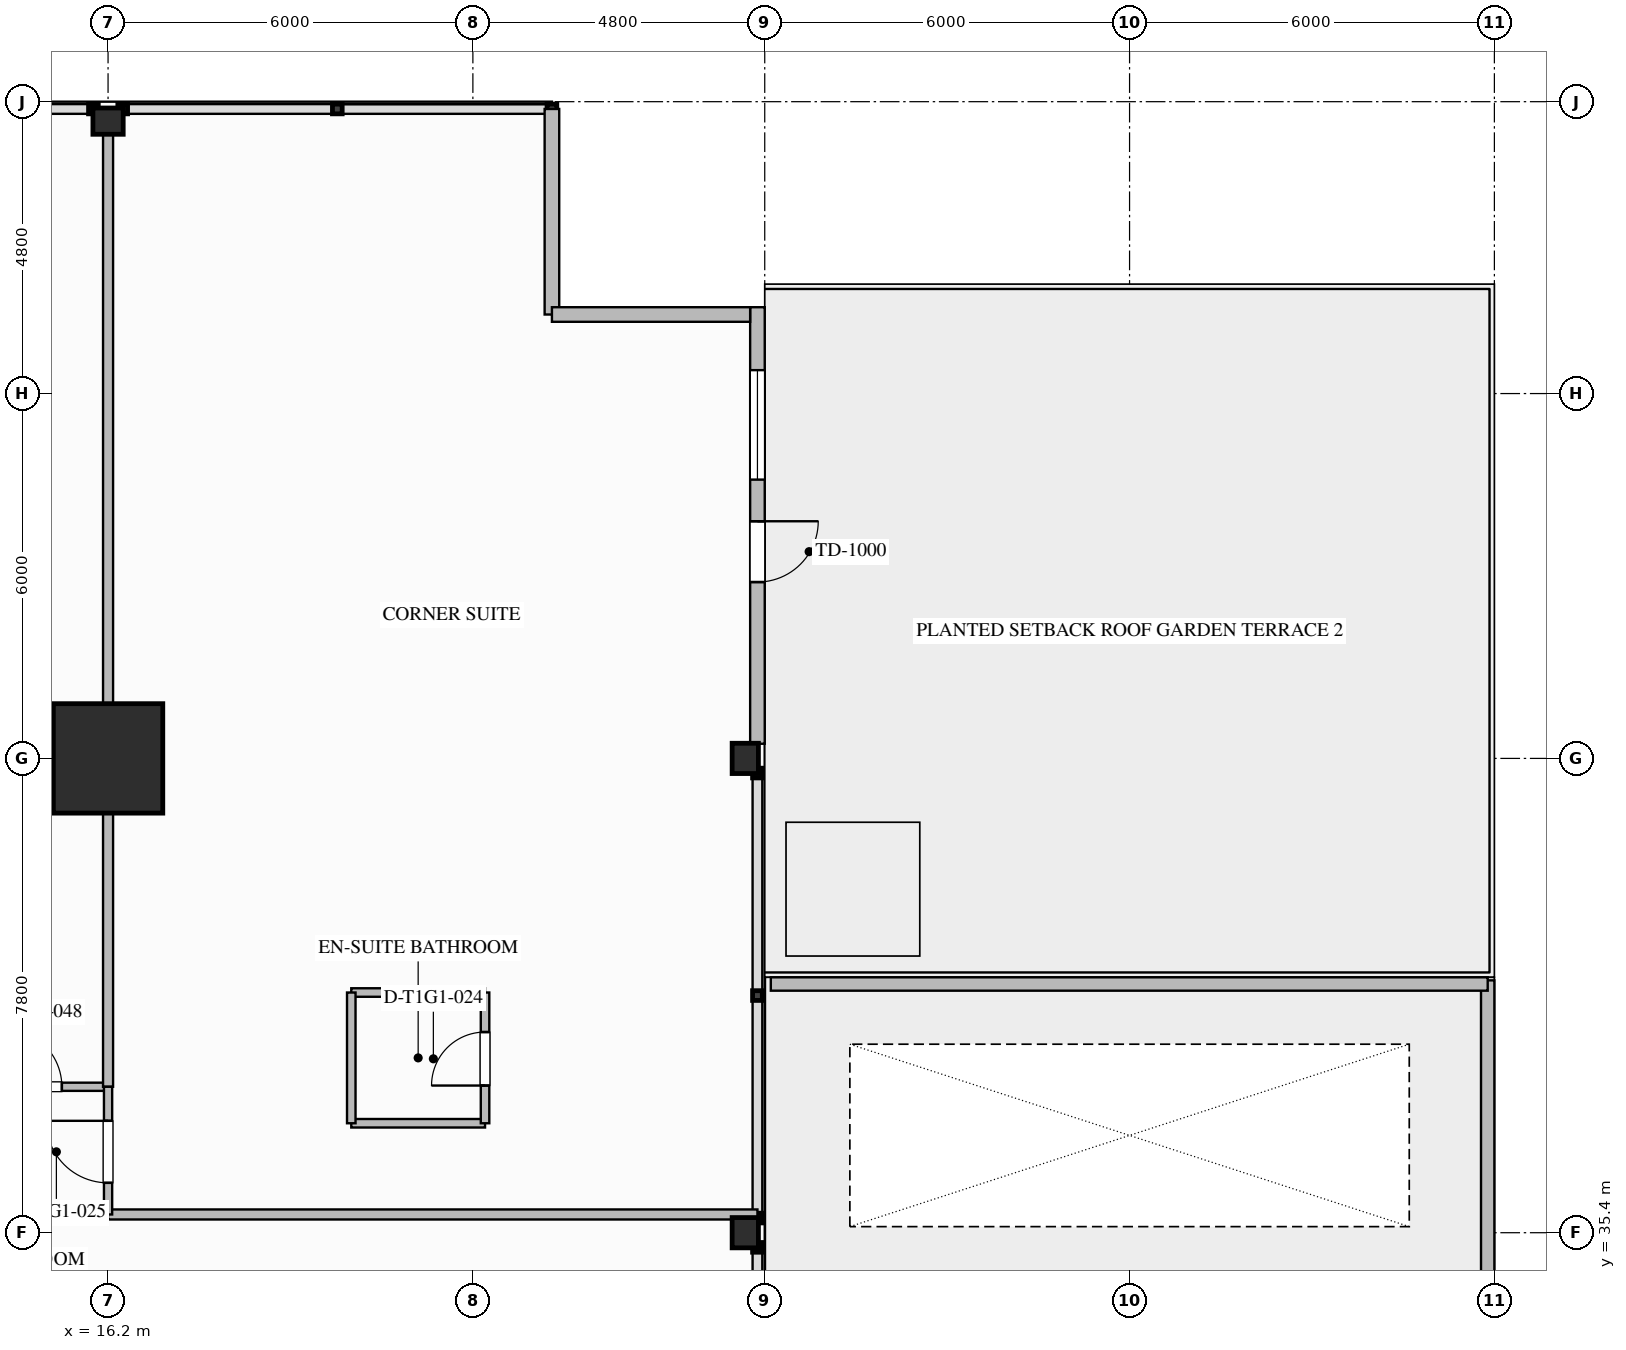
"""IFC4 building model, lengths in metres.
Left out: names, types, materials, properties, quantities, classifications, styles, units other than length and angle.
Written with IfcOpenShell. Run it as: python <this file> out.ifc"""

import sys

from ifc_helpers import new_model, si_unit, direction, frame, frame_2d, origin, origin_2d, place, context, subcontext, project, spatial, rectangle, i_section, extrude, element, fill, save


model = new_model("IFC4")
c1 = context("Model", 3, precision=1e-05, world=origin(), true_north=direction((0.0, 1.0)))
c2 = subcontext(c1, "Body", "Model", "MODEL_VIEW")
j1 = project(units=[si_unit("LENGTHUNIT", "METRE"), si_unit("PLANEANGLEUNIT", "RADIAN")], contexts=[c1])
p1 = place(None, origin())
s1 = spatial("IfcSite", under=j1, at=p1, CompositionType="ELEMENT")
p2 = place(p1, origin())
s2 = spatial("IfcBuilding", under=s1, at=p2, CompositionType="ELEMENT")
p3 = place(p2, frame((0.0, 0.0, 33.2)))
s3 = spatial("IfcBuildingStorey", under=s2, at=p3, CompositionType="ELEMENT", Elevation=33.2)
p4 = place(p3, frame((16.2, 43.2, 0.0), z_axis=(0.0, 0.0, 1.0), x_axis=(1.0, 0.0, 0.0)))
e1 = element("IfcColumn", 1, at=p4, inside=s3, PredefinedType="COLUMN", context=c2, shape_type="SweptSolid", body=[
    extrude(rectangle(XDim=1.8, YDim=1.8, at=origin_2d()), origin(), (0.0, 0.0, 1.0), 3.5),
])
for number, where, z_axis, x_axis in (
    (2, (26.68, 35.4, -0.26), (0.0, 0.0, 1.0), (1.0, 0.0, 0.0)),
    (3, (26.68, 43.2, -0.26), (0.0, 0.0, 1.0), (1.0, 0.0, 0.0)),
    (4, (16.2, 53.68, -0.26), (0.0, 0.0, 1.0), (0.0, 1.0, 0.0)),
):
    element("IfcColumn", number, at=place(p3, frame(where, z_axis=z_axis, x_axis=x_axis)), inside=s3, PredefinedType="COLUMN", context=c2, shape_type="SweptSolid", body=[
        extrude(i_section(OverallWidth=0.432, OverallDepth=0.498, WebThickness=0.056, FlangeThickness=0.089, FilletRadius=0.03, at=origin_2d()), origin(), (0.0, 0.0, 1.0), 3.757),
    ])
p5 = place(p3, frame((38.89, 39.55, 0.0), z_axis=(0.0, 0.0, 1.0), x_axis=(0.0, -1.0, 0.0)))
e5 = element("IfcWall", 5, at=p5, inside=s3, PredefinedType="PARAPET", context=c2, shape_type="SweptSolid", body=[
    extrude(rectangle(XDim=25.1, YDim=0.22, at=frame_2d((12.55, 0.0))), origin(), (0.0, 0.0, 1.0), 1.2),
])
p6 = place(p3, frame((27.1, 39.49, 0.0), z_axis=(0.0, 0.0, 1.0), x_axis=(1.0, 0.0, 0.0)))
e6 = element("IfcWall", 6, at=p6, inside=s3, PredefinedType="PARAPET", context=c2, shape_type="SweptSolid", body=[
    extrude(rectangle(XDim=11.79, YDim=0.22, at=frame_2d((5.895, 0.0))), origin(), (0.0, 0.0, 1.0), 1.2),
])
p7 = place(p3, frame((26.88, 50.62, 0.0), z_axis=(0.0, 0.0, 1.0), x_axis=(0.0, -1.0, 0.0)))
e7 = element("IfcWall", 7, at=p7, inside=s3, PredefinedType="STANDARD", context=c2, shape_type="SweptSolid", body=[
    extrude(rectangle(XDim=7.179, YDim=0.24, at=frame_2d((3.59, 0.0))), origin(), (0.0, 0.0, 1.0), 3.24),
])
p8 = place(p7, frame((3.52, 0.0, 0.0)))
e8 = element("IfcOpeningElement", 8, at=p8, cuts=e7, PredefinedType="OPENING", context=c2, shape_type="SweptSolid", body=[
    extrude(rectangle(XDim=1.0, YDim=2.2, at=frame_2d((0.5, 1.1))), frame((0.0, 0.13, 0.0), z_axis=(0.0, -1.0, 0.0), x_axis=(1.0, 0.0, 0.0)), (0.0, 0.0, 1.0), 0.26),
])
p9 = place(p7, frame((1.035, 0.0, 0.75)))
e9 = element("IfcOpeningElement", 9, at=p9, cuts=e7, PredefinedType="OPENING", context=c2, shape_type="SweptSolid", body=[
    extrude(rectangle(XDim=1.8, YDim=2.05, at=frame_2d((0.9, 1.025))), frame((0.0, 0.13, 0.0), z_axis=(0.0, -1.0, 0.0), x_axis=(1.0, 0.0, 0.0)), (0.0, 0.0, 1.0), 0.26),
])
p10 = place(p3, frame((23.5, 53.88, 0.0), z_axis=(0.0, 0.0, 1.0), x_axis=(0.0, -1.0, 0.0)))
e10 = element("IfcWall", 10, at=p10, inside=s3, PredefinedType="STANDARD", context=c2, shape_type="SweptSolid", body=[
    extrude(rectangle(XDim=3.38, YDim=0.24, at=frame_2d((1.69, 0.0))), origin(), (0.0, 0.0, 1.0), 3.24),
])
p11 = place(p3, frame((23.5, 50.5, 0.0), z_axis=(0.0, 0.0, 1.0), x_axis=(1.0, 0.0, 0.0)))
e11 = element("IfcWall", 11, at=p11, inside=s3, PredefinedType="STANDARD", context=c2, shape_type="SweptSolid", body=[
    extrude(rectangle(XDim=3.26, YDim=0.24, at=frame_2d((1.63, 0.0))), origin(), (0.0, 0.0, 1.0), 3.24),
])
p12 = place(p3, frame((-16.2, 37.8, 0.0), z_axis=(0.0, 0.0, 1.0), x_axis=(1.0, 0.0, 0.0)))
e12 = element("IfcWall", 12, at=p12, inside=s3, PredefinedType="PARTITIONING", context=c2, shape_type="SweptSolid", body=[
    extrude(rectangle(XDim=32.4, YDim=0.135, at=frame_2d((16.2, 0.0))), origin(), (0.0, 0.0, 1.0), 3.24),
])
p13 = place(p12, frame((3.189, 0.0, 0.0)))
e13 = element("IfcOpeningElement", 13, at=p13, cuts=e12, PredefinedType="OPENING", context=c2, shape_type="SweptSolid", body=[
    extrude(rectangle(XDim=0.96, YDim=2.15, at=frame_2d((0.48, 1.075))), frame((0.0, 0.077, 0.0), z_axis=(0.0, -1.0, 0.0), x_axis=(1.0, 0.0, 0.0)), (0.0, 0.0, 1.0), 0.155),
])
p14 = place(p12, frame((8.229, 0.0, 0.0)))
e14 = element("IfcOpeningElement", 14, at=p14, cuts=e12, PredefinedType="OPENING", context=c2, shape_type="SweptSolid", body=[
    extrude(rectangle(XDim=1.26, YDim=2.2, at=frame_2d((0.63, 1.1))), frame((0.0, 0.077, 0.0), z_axis=(0.0, -1.0, 0.0), x_axis=(1.0, 0.0, 0.0)), (0.0, 0.0, 1.0), 0.155),
])
p15 = place(p12, frame((12.78, 0.0, 0.0)))
e15 = element("IfcOpeningElement", 15, at=p15, cuts=e12, PredefinedType="OPENING", context=c2, shape_type="SweptSolid", body=[
    extrude(rectangle(XDim=1.02, YDim=2.15, at=frame_2d((0.51, 1.075))), frame((0.0, 0.077, 0.0), z_axis=(0.0, -1.0, 0.0), x_axis=(1.0, 0.0, 0.0)), (0.0, 0.0, 1.0), 0.155),
])
p16 = place(p12, frame((19.425, 0.0, 0.0)))
e16 = element("IfcOpeningElement", 16, at=p16, cuts=e12, PredefinedType="OPENING", context=c2, shape_type="SweptSolid", body=[
    extrude(rectangle(XDim=0.96, YDim=2.15, at=frame_2d((0.48, 1.075))), frame((0.0, 0.077, 0.0), z_axis=(0.0, -1.0, 0.0), x_axis=(1.0, 0.0, 0.0)), (0.0, 0.0, 1.0), 0.155),
])
p17 = place(p12, frame((24.92, 0.0, 0.0)))
e17 = element("IfcOpeningElement", 17, at=p17, cuts=e12, PredefinedType="OPENING", context=c2, shape_type="SweptSolid", body=[
    extrude(rectangle(XDim=1.26, YDim=2.2, at=frame_2d((0.63, 1.1))), frame((0.0, 0.077, 0.0), z_axis=(0.0, -1.0, 0.0), x_axis=(1.0, 0.0, 0.0)), (0.0, 0.0, 1.0), 0.155),
])
p18 = place(p12, frame((30.68, 0.0, 0.0)))
e18 = element("IfcOpeningElement", 18, at=p18, cuts=e12, PredefinedType="OPENING", context=c2, shape_type="SweptSolid", body=[
    extrude(rectangle(XDim=0.96, YDim=2.15, at=frame_2d((0.48, 1.075))), frame((0.0, 0.077, 0.0), z_axis=(0.0, -1.0, 0.0), x_axis=(1.0, 0.0, 0.0)), (0.0, 0.0, 1.0), 0.155),
])
p19 = place(p3, frame((10.8, 35.7, 0.0), z_axis=(0.0, 0.0, 1.0), x_axis=(1.0, 0.0, 0.0)))
e19 = element("IfcWall", 19, at=p19, inside=s3, PredefinedType="PARTITIONING", context=c2, shape_type="SweptSolid", body=[
    extrude(rectangle(XDim=5.4, YDim=0.135, at=frame_2d((2.7, 0.0))), origin(), (0.0, 0.0, 1.0), 3.24),
])
p20 = place(p3, frame((16.2, 37.8, 0.0), z_axis=(0.0, 0.0, 1.0), x_axis=(0.0, 1.0, 0.0)))
e20 = element("IfcWall", 20, at=p20, inside=s3, PredefinedType="PARTITIONING", context=c2, shape_type="SweptSolid", body=[
    extrude(rectangle(XDim=16.08, YDim=0.165, at=frame_2d((8.04, 0.0))), origin(), (0.0, 0.0, 1.0), 2.298),
])
p21 = place(p3, frame((16.2, 35.7, 0.0), z_axis=(0.0, 0.0, 1.0), x_axis=(1.0, 0.0, 0.0)))
e21 = element("IfcWall", 21, at=p21, inside=s3, PredefinedType="PARTITIONING", context=c2, shape_type="SweptSolid", body=[
    extrude(rectangle(XDim=10.68, YDim=0.165, at=frame_2d((5.34, 0.0))), origin(), (0.0, 0.0, 1.0), 2.298),
])
p22 = place(p3, frame((16.2, 35.7, 0.0), z_axis=(0.0, 0.0, 1.0), x_axis=(0.0, 1.0, 0.0)))
e22 = element("IfcWall", 22, at=p22, inside=s3, PredefinedType="PARTITIONING", context=c2, shape_type="SweptSolid", body=[
    extrude(rectangle(XDim=2.1, YDim=0.135, at=frame_2d((1.05, 0.0))), origin(), (0.0, 0.0, 1.0), 2.298),
])
p23 = place(p22, frame((0.52, 0.0, 0.0)))
e23 = element("IfcOpeningElement", 23, at=p23, cuts=e22, PredefinedType="OPENING", context=c2, shape_type="SweptSolid", body=[
    extrude(rectangle(XDim=1.02, YDim=2.15, at=frame_2d((0.51, 1.075))), frame((0.0, 0.077, 0.0), z_axis=(0.0, -1.0, 0.0), x_axis=(1.0, 0.0, 0.0)), (0.0, 0.0, 1.0), 0.155),
])
for number, where, z_axis, x_axis in (
    (24, (20.2, 37.2, 0.0), (0.0, 0.0, 1.0), (1.0, 0.0, 0.0)),
    (25, (20.2, 39.35, 0.0), (0.0, 0.0, 1.0), (1.0, 0.0, 0.0)),
):
    element("IfcWall", number, at=place(p3, frame(where, z_axis=z_axis, x_axis=x_axis)), inside=s3, PredefinedType="PLUMBINGWALL", context=c2, shape_type="SweptSolid", body=[
        extrude(rectangle(XDim=2.2, YDim=0.14, at=frame_2d((1.1, 0.0))), origin(), (0.0, 0.0, 1.0), 3.24),
    ])
p24 = place(p3, frame((20.2, 37.2, 0.0), z_axis=(0.0, 0.0, 1.0), x_axis=(0.0, 1.0, 0.0)))
e26 = element("IfcWall", 26, at=p24, inside=s3, PredefinedType="PLUMBINGWALL", context=c2, shape_type="SweptSolid", body=[
    extrude(rectangle(XDim=2.15, YDim=0.14, at=frame_2d((1.075, 0.0))), origin(), (0.0, 0.0, 1.0), 3.24),
])
p25 = place(p3, frame((22.4, 37.2, 0.0), z_axis=(0.0, 0.0, 1.0), x_axis=(0.0, 1.0, 0.0)))
e27 = element("IfcWall", 27, at=p25, inside=s3, PredefinedType="PLUMBINGWALL", context=c2, shape_type="SweptSolid", body=[
    extrude(rectangle(XDim=2.15, YDim=0.14, at=frame_2d((1.075, 0.0))), origin(), (0.0, 0.0, 1.0), 3.24),
])
p26 = place(p25, frame((0.62, 0.0, 0.0)))
e28 = element("IfcOpeningElement", 28, at=p26, cuts=e27, PredefinedType="OPENING", context=c2, shape_type="SweptSolid", body=[
    extrude(rectangle(XDim=0.88, YDim=2.1, at=frame_2d((0.44, 1.05))), frame((0.0, 0.08, 0.0), z_axis=(0.0, -1.0, 0.0), x_axis=(1.0, 0.0, 0.0)), (0.0, 0.0, 1.0), 0.16),
])
p27 = place(p3, frame((0.0, 0.0, -0.28)))
p28 = place(p27, frame((33.0, 37.0, 0.0)))
p29 = place(p28, frame((0.0, 0.0, 0.23)))
e29 = element("IfcWindow", 29, at=p29, inside=s3, PartitioningType="SINGLE_PANEL", PredefinedType="SKYLIGHT", context=c2, shape_type="SweptSolid", body=[
    extrude(rectangle(XDim=9.24, YDim=3.04, at=origin_2d()), origin(), (0.0, 0.0, 1.0), 0.05),
])
p30 = place(p8, origin())
e30 = element("IfcDoor", 30, at=p30, inside=s3, OperationType="SINGLE_SWING_LEFT", PredefinedType="DOOR", context=c2, shape_type="SweptSolid", body=[
    extrude(rectangle(XDim=1.0, YDim=2.2, at=frame_2d((0.5, 1.1))), frame((0.0, 0.025, 0.0), z_axis=(0.0, -1.0, 0.0), x_axis=(1.0, 0.0, 0.0)), (0.0, 0.0, 1.0), 0.05),
])
fill(e8, e30)
p31 = place(p9, origin())
e31 = element("IfcWindow", 31, at=p31, inside=s3, PartitioningType="SINGLE_PANEL", PredefinedType="WINDOW", context=c2, shape_type="SweptSolid", body=[
    extrude(rectangle(XDim=1.8, YDim=2.05, at=frame_2d((0.9, 1.025))), frame((0.0, 0.03, 0.0), z_axis=(0.0, -1.0, 0.0), x_axis=(1.0, 0.0, 0.0)), (0.0, 0.0, 1.0), 0.06),
])
fill(e9, e31)
p32 = place(p26, origin())
e32 = element("IfcDoor", 32, at=p32, inside=s3, OperationType="SINGLE_SWING_LEFT", PredefinedType="DOOR", context=c2, shape_type="SweptSolid", body=[
    extrude(rectangle(XDim=0.88, YDim=2.1, at=frame_2d((0.44, 1.05))), frame((0.0, 0.025, 0.0), z_axis=(0.0, -1.0, 0.0), x_axis=(1.0, 0.0, 0.0)), (0.0, 0.0, 1.0), 0.05),
])
fill(e28, e32)
p33 = place(p23, origin())
e33 = element("IfcDoor", 33, at=p33, inside=s3, OperationType="SINGLE_SWING_RIGHT", PredefinedType="DOOR", context=c2, shape_type="SweptSolid", body=[
    extrude(rectangle(XDim=1.02, YDim=2.15, at=frame_2d((0.51, 1.075))), frame((0.0, 0.025, 0.0), z_axis=(0.0, -1.0, 0.0), x_axis=(1.0, 0.0, 0.0)), (0.0, 0.0, 1.0), 0.05),
])
fill(e23, e33)
p34 = place(p18, origin())
e34 = element("IfcDoor", 34, at=p34, inside=s3, OperationType="SINGLE_SWING_LEFT", PredefinedType="DOOR", context=c2, shape_type="SweptSolid", body=[
    extrude(rectangle(XDim=0.96, YDim=2.15, at=frame_2d((0.48, 1.075))), frame((0.0, 0.025, 0.0), z_axis=(0.0, -1.0, 0.0), x_axis=(1.0, 0.0, 0.0)), (0.0, 0.0, 1.0), 0.05),
])
fill(e18, e34)
save(model, sys.argv[1])
